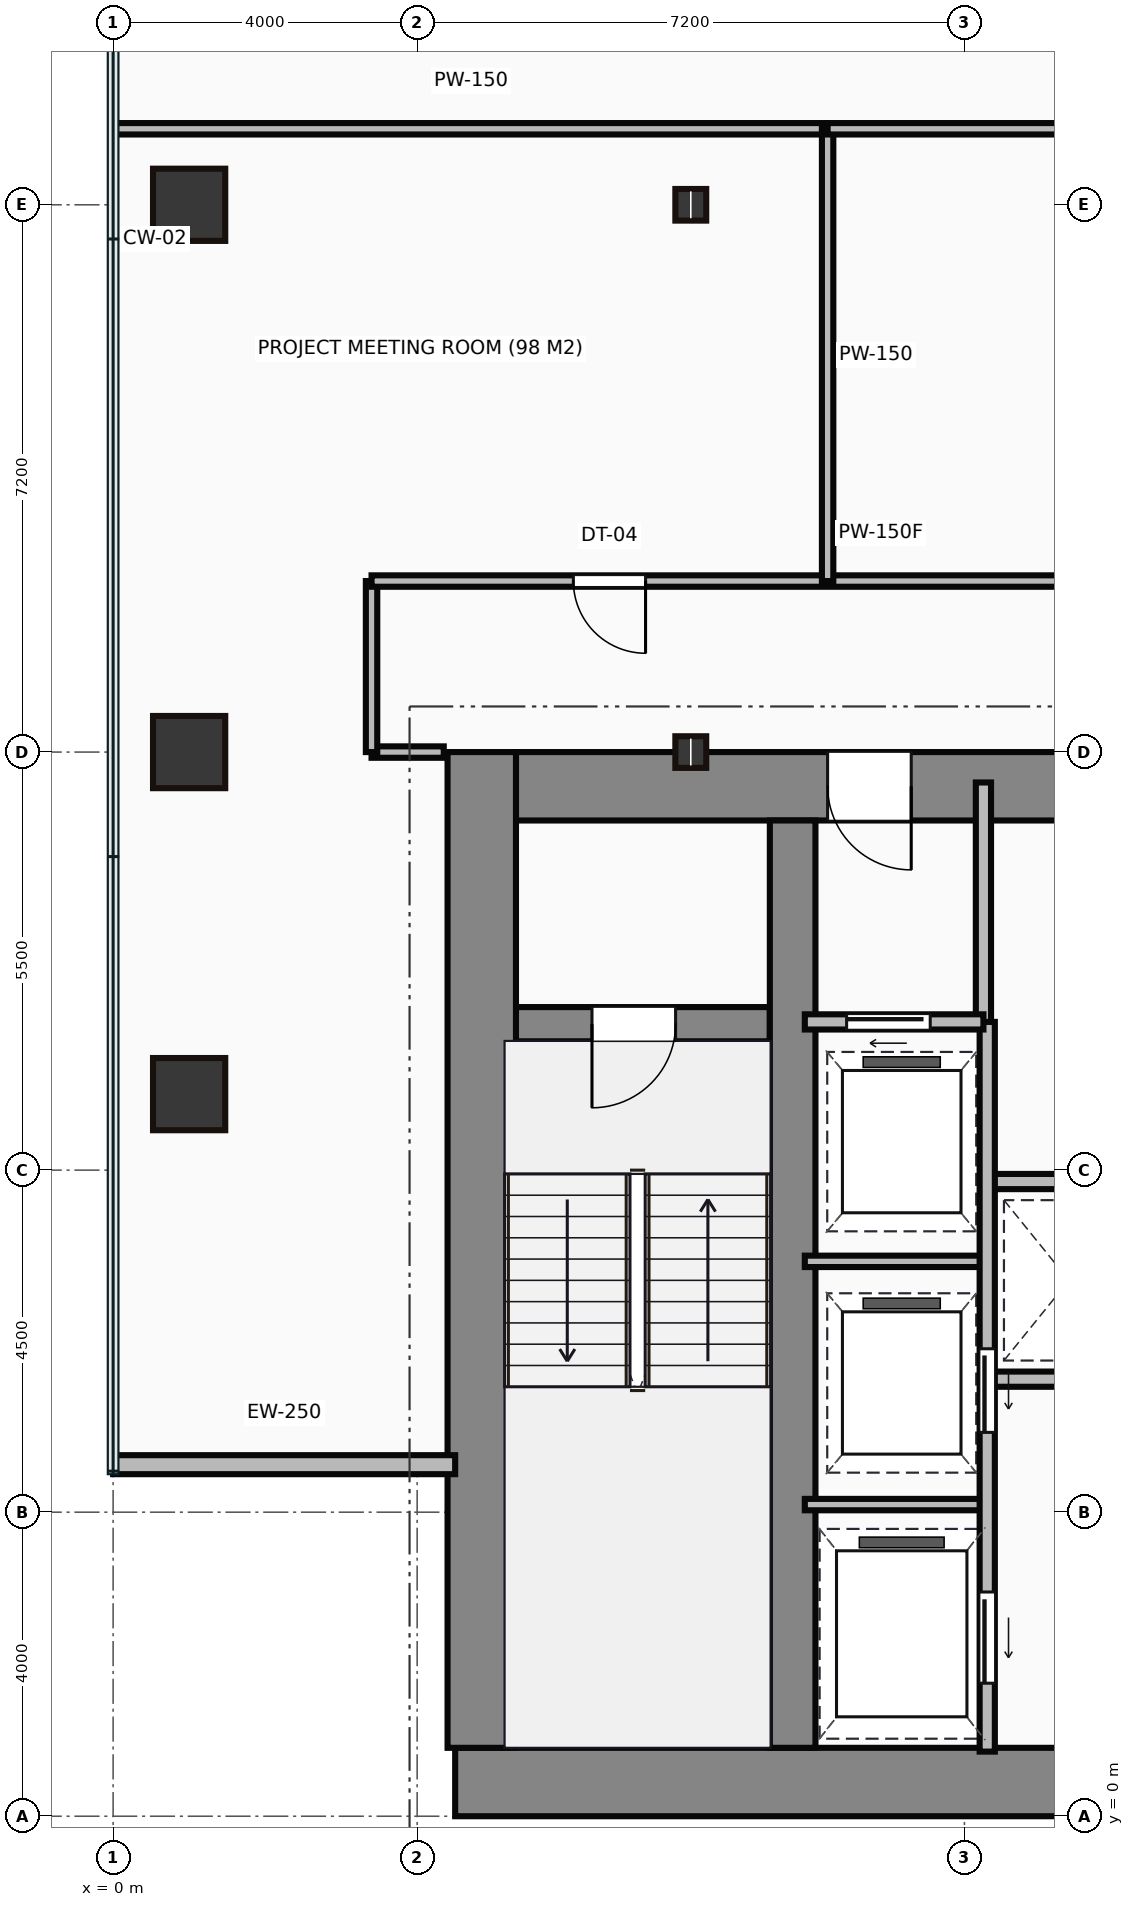
"""IFC4 building model, lengths in metres.
Left out: names, types, materials, properties, quantities, classifications, styles, units other than length and angle.
Written with IfcOpenShell. Run it as: python <this file> out.ifc"""

import sys

from ifc_helpers import new_model, si_unit, direction, frame, frame_2d, origin, origin_2d, place, context, subcontext, project, spatial, rectangle, hollow_rectangle, i_section, extrude, source, transform, mapped, element, fill, save


model = new_model("IFC4")
c1 = context("Model", 3, precision=1e-05, world=origin(), true_north=direction((0.0, 1.0)))
c2 = subcontext(c1, "Body", "Model", "MODEL_VIEW")
j1 = project(units=[si_unit("LENGTHUNIT", "METRE"), si_unit("PLANEANGLEUNIT", "RADIAN")], contexts=[c1])
p1 = place(None, origin())
s1 = spatial("IfcSite", under=j1, at=p1, CompositionType="ELEMENT")
p2 = place(p1, origin())
s2 = spatial("IfcBuilding", under=s1, at=p2, CompositionType="ELEMENT")
p3 = place(p2, frame((0.0, 0.0, 58.05)))
s3 = spatial("IfcBuildingStorey", under=s2, at=p3, CompositionType="ELEMENT", Elevation=58.05)
m1 = source(origin(), c2, "Body", "SweptSolid", [
    extrude(rectangle(XDim=29.5, YDim=0.9, at=frame_2d((14.75, 0.0))), origin(), (0.0, 0.0, 1.0), 3.65),
])
p4 = place(p3, frame((4.5, 0.45, 0.0), z_axis=(0.0, 0.0, 1.0), x_axis=(1.0, 0.0, 0.0)))
e1 = element("IfcWall", 1, at=p4, inside=s3, PredefinedType="SHEAR", context=c2, shape_type="MappedRepresentation", body=[
    mapped(m1, transform((0.0, 0.0, 0.0))),
])
m2 = source(origin(), c2, "Body", "SweptSolid", [
    extrude(rectangle(XDim=13.1, YDim=0.9, at=frame_2d((6.55, 0.0))), origin(), (0.0, 0.0, 1.0), 3.65),
])
p5 = place(p3, frame((4.85, 0.9, 0.0), z_axis=(0.0, 0.0, 1.0), x_axis=(0.0, 1.0, 0.0)))
e2 = element("IfcWall", 2, at=p5, inside=s3, PredefinedType="SHEAR", context=c2, shape_type="MappedRepresentation", body=[
    mapped(m2, transform((0.0, 0.0, 0.0))),
])
m3 = source(origin(), c2, "Body", "SweptSolid", [
    extrude(rectangle(XDim=9.1, YDim=0.9, at=frame_2d((4.55, 0.0))), origin(), (0.0, 0.0, 1.0), 3.65),
])
p6 = place(p3, frame((5.3, 13.55, 0.0), z_axis=(0.0, 0.0, 1.0), x_axis=(1.0, 0.0, 0.0)))
e3 = element("IfcWall", 3, at=p6, inside=s3, PredefinedType="SHEAR", context=c2, shape_type="MappedRepresentation", body=[
    mapped(m3, transform((0.0, 0.0, 0.0))),
])
p7 = place(p6, frame((4.1, 0.0, 0.0)))
e4 = element("IfcOpeningElement", 4, at=p7, cuts=e3, PredefinedType="OPENING", context=c2, shape_type="SweptSolid", body=[
    extrude(rectangle(XDim=1.1, YDim=2.15, at=frame_2d((0.55, 1.075))), frame((0.0, 0.46, 0.0), z_axis=(0.0, -1.0, 0.0), x_axis=(1.0, 0.0, 0.0)), (0.0, 0.0, 1.0), 0.92),
])
m4 = source(origin(), c2, "Body", "SweptSolid", [
    extrude(rectangle(XDim=12.2, YDim=0.6, at=frame_2d((6.1, 0.0))), origin(), (0.0, 0.0, 1.0), 3.65),
])
p8 = place(p3, frame((8.94, 0.9, 0.0), z_axis=(0.0, 0.0, 1.0), x_axis=(0.0, 1.0, 0.0)))
e5 = element("IfcWall", 5, at=p8, inside=s3, PredefinedType="SHEAR", context=c2, shape_type="MappedRepresentation", body=[
    mapped(m4, transform((0.0, 0.0, 0.0))),
])
m5 = source(origin(), c2, "Body", "SweptSolid", [
    extrude(rectangle(XDim=3.39, YDim=0.45, at=frame_2d((1.695, 0.0))), origin(), (0.0, 0.0, 1.0), 3.65),
])
p9 = place(p3, frame((5.25, 10.42, 0.0), z_axis=(0.0, 0.0, 1.0), x_axis=(1.0, 0.0, 0.0)))
e6 = element("IfcWall", 6, at=p9, inside=s3, PredefinedType="SHEAR", context=c2, shape_type="MappedRepresentation", body=[
    mapped(m5, transform((0.0, 0.0, 0.0))),
])
p10 = place(p9, frame((1.05, 0.0, 0.0)))
e7 = element("IfcOpeningElement", 7, at=p10, cuts=e6, PredefinedType="OPENING", context=c2, shape_type="SweptSolid", body=[
    extrude(rectangle(XDim=1.1, YDim=2.15, at=frame_2d((0.55, 1.075))), frame((0.0, 0.235, 0.0), z_axis=(0.0, -1.0, 0.0), x_axis=(1.0, 0.0, 0.0)), (0.0, 0.0, 1.0), 0.47),
])
m6 = source(origin(), c2, "Body", "SweptSolid", [
    extrude(hollow_rectangle(XDim=0.95, YDim=0.95, WallThickness=0.045, at=origin_2d()), origin(), (0.0, 0.0, 1.0), 3.65),
])
for number, where, z_axis, x_axis in (
    (8, (1.0, 9.5, 0.0), (0.0, 0.0, 1.0), (1.0, 0.0, 0.0)),
    (9, (1.0, 14.0, 0.0), (0.0, 0.0, 1.0), (1.0, 0.0, 0.0)),
    (10, (1.0, 21.2, 0.0), (0.0, 0.0, 1.0), (1.0, 0.0, 0.0)),
):
    element("IfcColumn", number, at=place(p3, frame(where, z_axis=z_axis, x_axis=x_axis)), inside=s3, PredefinedType="COLUMN", context=c2, shape_type="MappedRepresentation", body=[
        mapped(m6, transform((0.0, 0.0, 0.0))),
    ])
m7 = source(origin(), c2, "Body", "SweptSolid", [
    extrude(i_section(OverallWidth=0.406, OverallDepth=0.416, WebThickness=0.03, FlangeThickness=0.048, at=origin_2d()), origin(), (0.0, 0.0, 1.0), 3.65),
])
for number, where, z_axis, x_axis in (
    (11, (7.6, 14.0, 0.0), (0.0, 0.0, 1.0), (1.0, 0.0, 0.0)),
    (12, (7.6, 21.2, 0.0), (0.0, 0.0, 1.0), (1.0, 0.0, 0.0)),
):
    element("IfcColumn", number, at=place(p3, frame(where, z_axis=z_axis, x_axis=x_axis)), inside=s3, PredefinedType="COLUMN", context=c2, shape_type="MappedRepresentation", body=[
        mapped(m7, transform((0.0, 0.0, 0.0))),
    ])
m8 = source(origin(), c2, "Body", "SweptSolid", [
    extrude(rectangle(XDim=4.5, YDim=0.25, at=frame_2d((2.25, 0.0))), origin(), (0.0, 0.0, 1.0), 3.4),
])
p11 = place(p3, frame((0.0, 4.625, 0.0), z_axis=(0.0, 0.0, 1.0), x_axis=(1.0, 0.0, 0.0)))
e13 = element("IfcWall", 13, at=p11, inside=s3, PredefinedType="STANDARD", context=c2, shape_type="MappedRepresentation", body=[
    mapped(m8, transform((0.0, 0.0, 0.0))),
])
m9 = source(origin(), c2, "Body", "SweptSolid", [
    extrude(rectangle(XDim=3.18, YDim=0.2, at=frame_2d((1.59, 0.0))), origin(), (0.0, 0.0, 1.0), 3.4),
])
p12 = place(p3, frame((11.45, 10.42, 0.0), z_axis=(0.0, 0.0, 1.0), x_axis=(0.0, 1.0, 0.0)))
e14 = element("IfcWall", 14, at=p12, inside=s3, PredefinedType="PARTITIONING", context=c2, shape_type="MappedRepresentation", body=[
    mapped(m9, transform((0.0, 0.0, 0.0))),
])
m10 = source(origin(), c2, "Body", "SweptSolid", [
    extrude(rectangle(XDim=2.35, YDim=0.2, at=frame_2d((1.175, 0.0))), origin(), (0.0, 0.0, 1.0), 3.4),
])
p13 = place(p3, frame((9.1, 10.45, 0.0), z_axis=(0.0, 0.0, 1.0), x_axis=(1.0, 0.0, 0.0)))
e15 = element("IfcWall", 15, at=p13, inside=s3, PredefinedType="PARTITIONING", context=c2, shape_type="MappedRepresentation", body=[
    mapped(m10, transform((0.0, 0.0, 0.0))),
])
p14 = place(p13, frame((0.55, 0.0, 0.0)))
e16 = element("IfcOpeningElement", 16, at=p14, cuts=e15, PredefinedType="OPENING", context=c2, shape_type="SweptSolid", body=[
    extrude(rectangle(XDim=1.1, YDim=2.15, at=frame_2d((0.55, 1.075))), frame((0.0, 0.11, 0.0), z_axis=(0.0, -1.0, 0.0), x_axis=(1.0, 0.0, 0.0)), (0.0, 0.0, 1.0), 0.22),
])
m11 = source(origin(), c2, "Body", "SweptSolid", [
    extrude(rectangle(XDim=9.6, YDim=0.2, at=frame_2d((4.8, 0.0))), origin(), (0.0, 0.0, 1.0), 3.4),
])
p15 = place(p3, frame((11.5, 0.85, 0.0), z_axis=(0.0, 0.0, 1.0), x_axis=(0.0, 1.0, 0.0)))
e17 = element("IfcWall", 17, at=p15, inside=s3, PredefinedType="PARTITIONING", context=c2, shape_type="MappedRepresentation", body=[
    mapped(m11, transform((0.0, 0.0, 0.0))),
])
p16 = place(p15, frame((4.2, 0.0, 0.0)))
e18 = element("IfcOpeningElement", 18, at=p16, cuts=e17, PredefinedType="OPENING", context=c2, shape_type="SweptSolid", body=[
    extrude(rectangle(XDim=1.1, YDim=2.15, at=frame_2d((0.55, 1.075))), frame((0.0, 0.11, 0.0), z_axis=(0.0, -1.0, 0.0), x_axis=(1.0, 0.0, 0.0)), (0.0, 0.0, 1.0), 0.22),
])
p17 = place(p15, frame((0.9, 0.0, 0.0)))
e19 = element("IfcOpeningElement", 19, at=p17, cuts=e17, PredefinedType="OPENING", context=c2, shape_type="SweptSolid", body=[
    extrude(rectangle(XDim=1.2, YDim=2.15, at=frame_2d((0.6, 1.075))), frame((0.0, 0.11, 0.0), z_axis=(0.0, -1.0, 0.0), x_axis=(1.0, 0.0, 0.0)), (0.0, 0.0, 1.0), 0.22),
])
m12 = source(origin(), c2, "Body", "SweptSolid", [
    extrude(rectangle(XDim=2.4, YDim=0.15, at=frame_2d((1.2, 0.0))), origin(), (0.0, 0.0, 1.0), 3.4),
])
for number, where, z_axis, x_axis in (
    (20, (9.1, 4.1, 0.0), (0.0, 0.0, 1.0), (1.0, 0.0, 0.0)),
    (21, (9.1, 7.3, 0.0), (0.0, 0.0, 1.0), (1.0, 0.0, 0.0)),
):
    element("IfcWall", number, at=place(p3, frame(where, z_axis=z_axis, x_axis=x_axis)), inside=s3, PredefinedType="PARTITIONING", context=c2, shape_type="MappedRepresentation", body=[
        mapped(m12, transform((0.0, 0.0, 0.0))),
    ])
m13 = source(origin(), c2, "Body", "SweptSolid", [
    extrude(rectangle(XDim=11.85, YDim=0.2, at=frame_2d((5.925, 0.0))), origin(), (0.0, 0.0, 1.0), 3.4),
])
for number, where, z_axis, x_axis in (
    (22, (11.55, 5.75, 0.0), (0.0, 0.0, 1.0), (1.0, 0.0, 0.0)),
    (23, (11.55, 8.35, 0.0), (0.0, 0.0, 1.0), (1.0, 0.0, 0.0)),
):
    element("IfcWall", number, at=place(p3, frame(where, z_axis=z_axis, x_axis=x_axis)), inside=s3, PredefinedType="PARTITIONING", context=c2, shape_type="MappedRepresentation", body=[
        mapped(m13, transform((0.0, 0.0, 0.0))),
    ])
m14 = source(origin(), c2, "Body", "SweptSolid", [
    extrude(rectangle(XDim=0.95, YDim=0.15, at=frame_2d((0.475, 0.0))), origin(), (0.0, 0.0, 1.0), 2.625),
])
p18 = place(p3, frame((4.35, 14.0, 0.0), z_axis=(0.0, 0.0, 1.0), x_axis=(-1.0, 0.0, 0.0)))
e24 = element("IfcWall", 24, at=p18, inside=s3, PredefinedType="PARTITIONING", context=c2, shape_type="MappedRepresentation", body=[
    mapped(m14, transform((0.0, 0.0, 0.0))),
])
m15 = source(origin(), c2, "Body", "SweptSolid", [
    extrude(rectangle(XDim=2.25, YDim=0.15, at=frame_2d((1.125, 0.0))), origin(), (0.0, 0.0, 1.0), 3.4),
])
p19 = place(p3, frame((3.4, 14.0, 0.0), z_axis=(0.0, 0.0, 1.0), x_axis=(0.0, 1.0, 0.0)))
e25 = element("IfcWall", 25, at=p19, inside=s3, PredefinedType="PARTITIONING", context=c2, shape_type="MappedRepresentation", body=[
    mapped(m15, transform((0.0, 0.0, 0.0))),
])
m16 = source(origin(), c2, "Body", "SweptSolid", [
    extrude(rectangle(XDim=13.4, YDim=0.15, at=frame_2d((6.7, 0.0))), origin(), (0.0, 0.0, 1.0), 3.4),
])
p20 = place(p3, frame((3.4, 16.25, 0.0), z_axis=(0.0, 0.0, 1.0), x_axis=(1.0, 0.0, 0.0)))
e26 = element("IfcWall", 26, at=p20, inside=s3, PredefinedType="PARTITIONING", context=c2, shape_type="MappedRepresentation", body=[
    mapped(m16, transform((0.0, 0.0, 0.0))),
])
p21 = place(p20, frame((2.655, 0.0, 0.0)))
e27 = element("IfcOpeningElement", 27, at=p21, cuts=e26, PredefinedType="OPENING", context=c2, shape_type="SweptSolid", body=[
    extrude(rectangle(XDim=0.95, YDim=2.15, at=frame_2d((0.475, 1.075))), frame((0.0, 0.085, 0.0), z_axis=(0.0, -1.0, 0.0), x_axis=(1.0, 0.0, 0.0)), (0.0, 0.0, 1.0), 0.17),
])
p22 = place(p20, frame((9.095, 0.0, 0.0)))
e28 = element("IfcOpeningElement", 28, at=p22, cuts=e26, PredefinedType="OPENING", context=c2, shape_type="SweptSolid", body=[
    extrude(rectangle(XDim=0.95, YDim=2.15, at=frame_2d((0.475, 1.075))), frame((0.0, 0.085, 0.0), z_axis=(0.0, -1.0, 0.0), x_axis=(1.0, 0.0, 0.0)), (0.0, 0.0, 1.0), 0.17),
])
m17 = source(origin(), c2, "Body", "SweptSolid", [
    extrude(rectangle(XDim=9.38, YDim=0.15, at=frame_2d((4.69, 0.0))), origin(), (0.0, 0.0, 1.0), 3.4),
])
p23 = place(p3, frame((0.02, 22.2, 0.0), z_axis=(0.0, 0.0, 1.0), x_axis=(1.0, 0.0, 0.0)))
e29 = element("IfcWall", 29, at=p23, inside=s3, PredefinedType="PARTITIONING", context=c2, shape_type="MappedRepresentation", body=[
    mapped(m17, transform((0.0, 0.0, 0.0))),
])
m18 = source(origin(), c2, "Body", "SweptSolid", [
    extrude(rectangle(XDim=5.95, YDim=0.15, at=frame_2d((2.975, 0.0))), origin(), (0.0, 0.0, 1.0), 3.4),
])
p24 = place(p3, frame((9.4, 22.2, 0.0), z_axis=(0.0, 0.0, 1.0), x_axis=(0.0, -1.0, 0.0)))
e30 = element("IfcWall", 30, at=p24, inside=s3, PredefinedType="PARTITIONING", context=c2, shape_type="MappedRepresentation", body=[
    mapped(m18, transform((0.0, 0.0, 0.0))),
])
m19 = source(origin(), c2, "Body", "SweptSolid", [
    extrude(rectangle(XDim=7.4, YDim=0.15, at=frame_2d((3.7, 0.0))), origin(), (0.0, 0.0, 1.0), 3.4),
])
p25 = place(p3, frame((16.8, 22.2, 0.0), z_axis=(0.0, 0.0, 1.0), x_axis=(-1.0, 0.0, 0.0)))
e31 = element("IfcWall", 31, at=p25, inside=s3, PredefinedType="PARTITIONING", context=c2, shape_type="MappedRepresentation", body=[
    mapped(m19, transform((0.0, 0.0, 0.0))),
])
m20 = source(origin(), c2, "Body", "SweptSolid", [
    extrude(rectangle(XDim=1.1, YDim=2.15, at=frame_2d((0.55, 1.075))), frame((0.0, 0.025, 0.0), z_axis=(0.0, -1.0, 0.0), x_axis=(1.0, 0.0, 0.0)), (0.0, 0.0, 1.0), 0.05),
])
p26 = place(p10, frame((1.1, 0.0, 0.0), z_axis=(0.0, 0.0, 1.0), x_axis=(-1.0, 0.0, 0.0)))
e32 = element("IfcDoor", 32, at=p26, inside=s3, OperationType="SINGLE_SWING_LEFT", PredefinedType="DOOR", context=c2, shape_type="MappedRepresentation", body=[
    mapped(m20, transform((0.0, 0.0, 0.0))),
])
fill(e7, e32)
p27 = place(p7, origin())
e33 = element("IfcDoor", 33, at=p27, inside=s3, OperationType="SINGLE_SWING_RIGHT", PredefinedType="DOOR", context=c2, shape_type="MappedRepresentation", body=[
    mapped(m20, transform((0.0, 0.0, 0.0))),
])
fill(e4, e33)
p28 = place(p14, origin())
e34 = element("IfcDoor", 34, at=p28, inside=s3, OperationType="SLIDING_TO_LEFT", PredefinedType="DOOR", context=c2, shape_type="MappedRepresentation", body=[
    mapped(m20, transform((0.0, 0.0, 0.0))),
])
fill(e16, e34)
p29 = place(p16, frame((1.1, 0.0, 0.0), z_axis=(0.0, 0.0, 1.0), x_axis=(-1.0, 0.0, 0.0)))
e35 = element("IfcDoor", 35, at=p29, inside=s3, OperationType="SLIDING_TO_LEFT", PredefinedType="DOOR", context=c2, shape_type="MappedRepresentation", body=[
    mapped(m20, transform((0.0, 0.0, 0.0))),
])
fill(e18, e35)
m21 = source(origin(), c2, "Body", "SweptSolid", [
    extrude(rectangle(XDim=1.2, YDim=2.15, at=frame_2d((0.6, 1.075))), frame((0.0, 0.025, 0.0), z_axis=(0.0, -1.0, 0.0), x_axis=(1.0, 0.0, 0.0)), (0.0, 0.0, 1.0), 0.05),
])
p30 = place(p17, frame((1.2, 0.0, 0.0), z_axis=(0.0, 0.0, 1.0), x_axis=(-1.0, 0.0, 0.0)))
e36 = element("IfcDoor", 36, at=p30, inside=s3, OperationType="SLIDING_TO_LEFT", PredefinedType="DOOR", context=c2, shape_type="MappedRepresentation", body=[
    mapped(m21, transform((0.0, 0.0, 0.0))),
])
fill(e19, e36)
m22 = source(origin(), c2, "Body", "SweptSolid", [
    extrude(rectangle(XDim=0.95, YDim=2.15, at=frame_2d((0.475, 1.075))), frame((0.0, 0.025, 0.0), z_axis=(0.0, -1.0, 0.0), x_axis=(1.0, 0.0, 0.0)), (0.0, 0.0, 1.0), 0.05),
])
p31 = place(p21, origin())
e37 = element("IfcDoor", 37, at=p31, inside=s3, OperationType="SINGLE_SWING_RIGHT", PredefinedType="DOOR", context=c2, shape_type="MappedRepresentation", body=[
    mapped(m22, transform((0.0, 0.0, 0.0))),
])
fill(e27, e37)
save(model, sys.argv[1])
